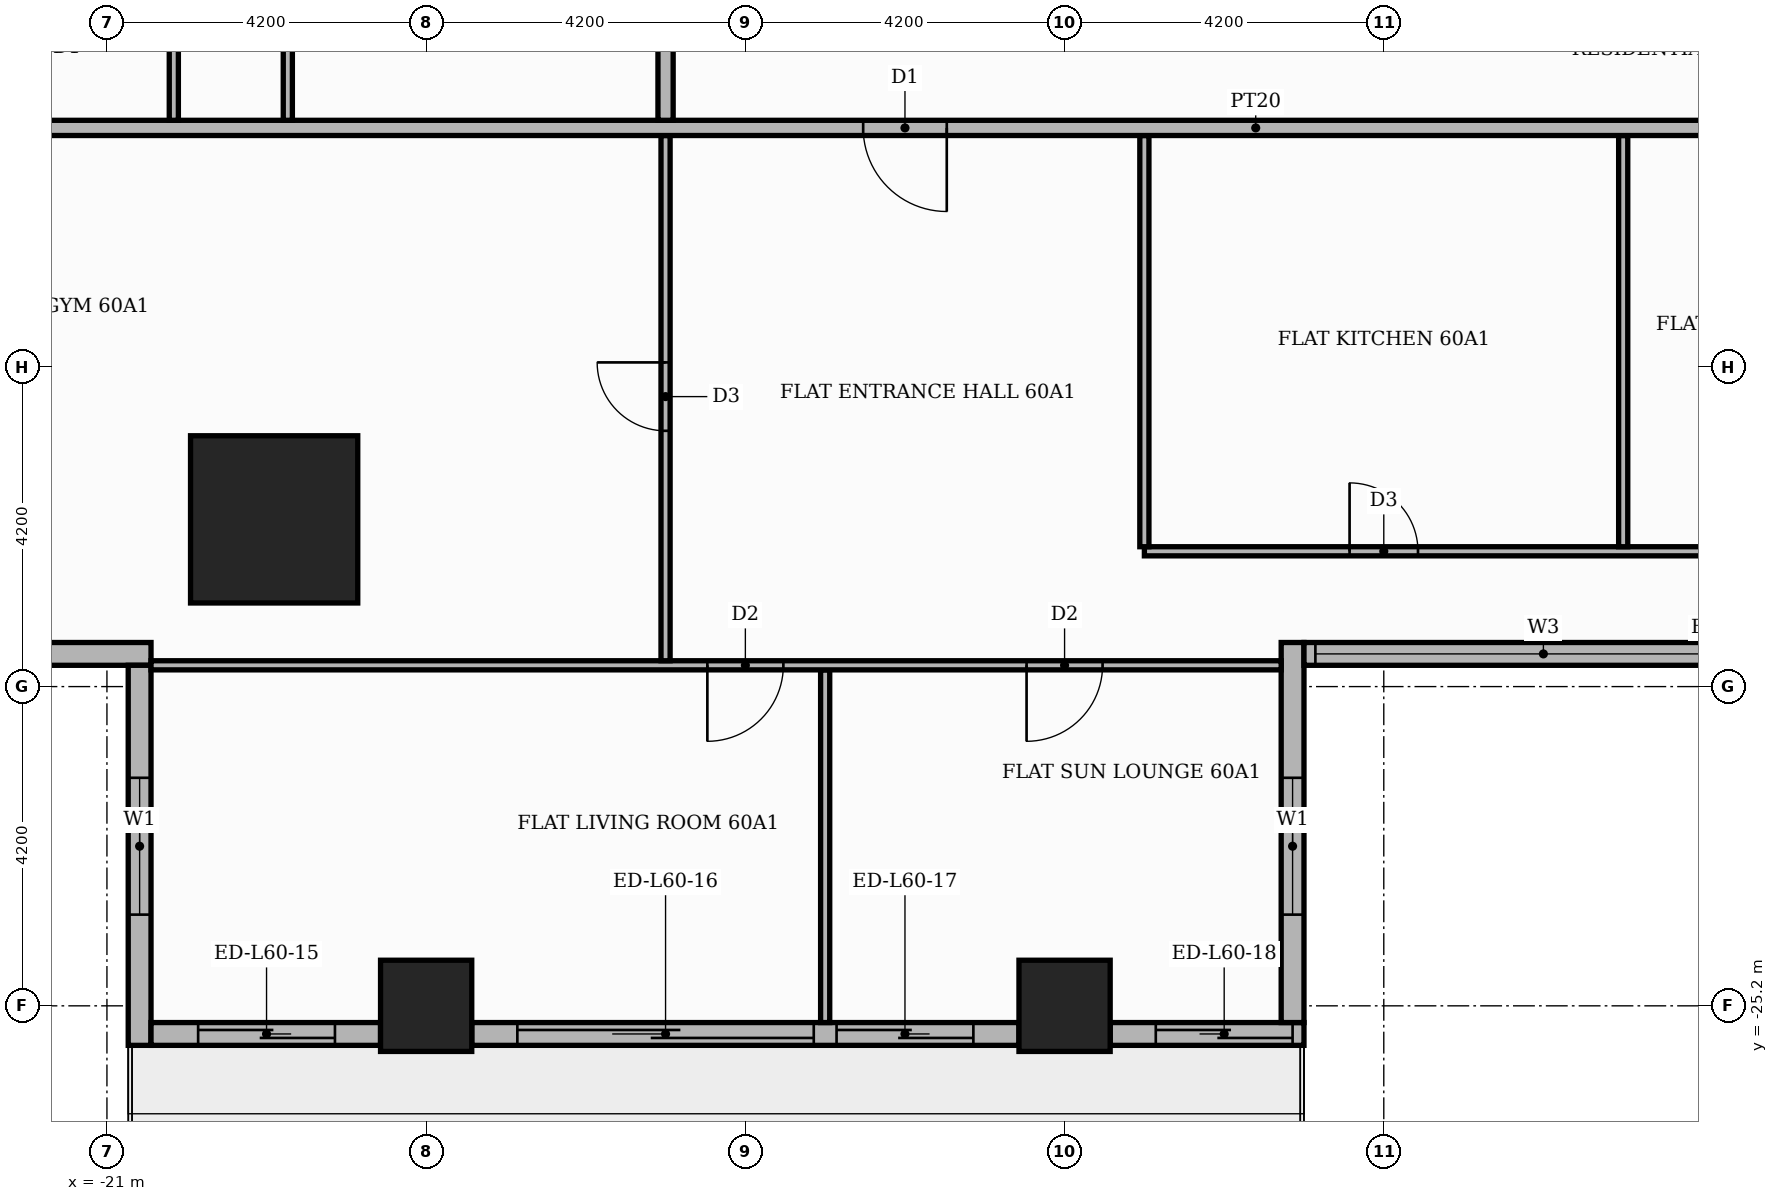
"""IFC4 building model, lengths in metres.
Left out: names, types, materials, properties, quantities, classifications, styles, units other than length and angle.
Written with IfcOpenShell. Run it as: python <this file> out.ifc"""

import sys

from ifc_helpers import new_model, si_unit, direction, frame, frame_2d, origin, origin_2d, place, context, subcontext, project, spatial, rectangle, extrude, element, fill, save


model = new_model("IFC4")
c1 = context("Model", 3, precision=1e-05, world=origin(), true_north=direction((0.0, 1.0)))
c2 = subcontext(c1, "Body", "Model", "MODEL_VIEW")
j1 = project(units=[si_unit("LENGTHUNIT", "METRE"), si_unit("PLANEANGLEUNIT", "RADIAN")], contexts=[c1])
p1 = place(None, origin())
s1 = spatial("IfcSite", under=j1, at=p1, CompositionType="ELEMENT")
p2 = place(p1, origin())
s2 = spatial("IfcBuilding", under=s1, at=p2, CompositionType="ELEMENT")
p3 = place(p2, frame((0.0, 0.0, 252.3)))
s3 = spatial("IfcBuildingStorey", under=s2, at=p3, CompositionType="ELEMENT", Elevation=252.3)
p4 = place(p3, frame((-18.8, -18.8, 0.0), z_axis=(0.0, 0.0, 1.0), x_axis=(1.0, 0.0, 0.0)))
e1 = element("IfcColumn", 1, at=p4, inside=s3, PredefinedType="COLUMN", context=c2, shape_type="SweptSolid", body=[
    extrude(rectangle(XDim=2.2, YDim=2.2, at=origin_2d()), origin(), (0.0, 0.0, 1.0), 3.9),
])
for number, where, z_axis, x_axis in (
    (2, (-8.4, -25.2, 0.0), (0.0, 0.0, 1.0), (1.0, 0.0, 0.0)),
    (3, (-16.8, -25.2, 0.0), (0.0, 0.0, 1.0), (1.0, 0.0, 0.0)),
):
    element("IfcColumn", number, at=place(p3, frame(where, z_axis=z_axis, x_axis=x_axis)), inside=s3, PredefinedType="COLUMN", context=c2, shape_type="SweptSolid", body=[
        extrude(rectangle(XDim=1.2, YDim=1.2, at=origin_2d()), origin(), (0.0, 0.0, 1.0), 3.9),
    ])
p5 = place(p3, frame((-25.42, -20.57, 0.0), z_axis=(0.0, 0.0, 1.0), x_axis=(1.0, 0.0, 0.0)))
e4 = element("IfcWall", 4, at=p5, inside=s3, PredefinedType="STANDARD", context=c2, shape_type="SweptSolid", body=[
    extrude(rectangle(XDim=5.0, YDim=0.3, at=frame_2d((2.5, 0.0))), origin(), (0.0, 0.0, 1.0), 3.48),
])
p6 = place(p5, frame((1.42, 0.0, 0.9)))
e5 = element("IfcOpeningElement", 5, at=p6, cuts=e4, PredefinedType="OPENING", context=c2, shape_type="SweptSolid", body=[
    extrude(rectangle(XDim=1.8, YDim=2.1, at=frame_2d((0.9, 1.05))), frame((0.0, 0.16, 0.0), z_axis=(0.0, -1.0, 0.0), x_axis=(1.0, 0.0, 0.0)), (0.0, 0.0, 1.0), 0.32),
])
p7 = place(p3, frame((-20.57, -20.72, 0.0), z_axis=(0.0, 0.0, 1.0), x_axis=(0.0, -1.0, 0.0)))
e6 = element("IfcWall", 6, at=p7, inside=s3, PredefinedType="STANDARD", context=c2, shape_type="SweptSolid", body=[
    extrude(rectangle(XDim=5.0, YDim=0.3, at=frame_2d((2.5, 0.0))), origin(), (0.0, 0.0, 1.0), 3.48),
])
p8 = place(p7, frame((1.48, 0.0, 0.9)))
e7 = element("IfcOpeningElement", 7, at=p8, cuts=e6, PredefinedType="OPENING", context=c2, shape_type="SweptSolid", body=[
    extrude(rectangle(XDim=1.8, YDim=2.1, at=frame_2d((0.9, 1.05))), frame((0.0, 0.16, 0.0), z_axis=(0.0, -1.0, 0.0), x_axis=(1.0, 0.0, 0.0)), (0.0, 0.0, 1.0), 0.32),
])
p9 = place(p3, frame((-20.42, -25.57, 0.0), z_axis=(0.0, 0.0, 1.0), x_axis=(1.0, 0.0, 0.0)))
e8 = element("IfcWall", 8, at=p9, inside=s3, PredefinedType="STANDARD", context=c2, shape_type="SweptSolid", body=[
    extrude(rectangle(XDim=3.02, YDim=0.3, at=frame_2d((1.51, 0.0))), origin(), (0.0, 0.0, 1.0), 3.48),
])
p10 = place(p9, frame((0.62, 0.0, 0.0)))
e9 = element("IfcOpeningElement", 9, at=p10, cuts=e8, PredefinedType="OPENING", context=c2, shape_type="SweptSolid", body=[
    extrude(rectangle(XDim=1.8, YDim=2.4, at=frame_2d((0.9, 1.2))), frame((0.0, 0.16, 0.0), z_axis=(0.0, -1.0, 0.0), x_axis=(1.0, 0.0, 0.0)), (0.0, 0.0, 1.0), 0.32),
])
p11 = place(p3, frame((-16.2, -25.57, 0.0), z_axis=(0.0, 0.0, 1.0), x_axis=(1.0, 0.0, 0.0)))
e10 = element("IfcWall", 10, at=p11, inside=s3, PredefinedType="STANDARD", context=c2, shape_type="SweptSolid", body=[
    extrude(rectangle(XDim=7.2, YDim=0.3, at=frame_2d((3.6, 0.0))), origin(), (0.0, 0.0, 1.0), 3.48),
])
p12 = place(p11, frame((0.6, 0.0, 0.0)))
e11 = element("IfcOpeningElement", 11, at=p12, cuts=e10, PredefinedType="OPENING", context=c2, shape_type="SweptSolid", body=[
    extrude(rectangle(XDim=3.9, YDim=2.4, at=frame_2d((1.95, 1.2))), frame((0.0, 0.16, 0.0), z_axis=(0.0, -1.0, 0.0), x_axis=(1.0, 0.0, 0.0)), (0.0, 0.0, 1.0), 0.32),
])
p13 = place(p11, frame((4.8, 0.0, 0.0)))
e12 = element("IfcOpeningElement", 12, at=p13, cuts=e10, PredefinedType="OPENING", context=c2, shape_type="SweptSolid", body=[
    extrude(rectangle(XDim=1.8, YDim=2.4, at=frame_2d((0.9, 1.2))), frame((0.0, 0.16, 0.0), z_axis=(0.0, -1.0, 0.0), x_axis=(1.0, 0.0, 0.0)), (0.0, 0.0, 1.0), 0.32),
])
p14 = place(p3, frame((-7.8, -25.57, 0.0), z_axis=(0.0, 0.0, 1.0), x_axis=(1.0, 0.0, 0.0)))
e13 = element("IfcWall", 13, at=p14, inside=s3, PredefinedType="STANDARD", context=c2, shape_type="SweptSolid", body=[
    extrude(rectangle(XDim=2.55, YDim=0.3, at=frame_2d((1.275, 0.0))), origin(), (0.0, 0.0, 1.0), 3.48),
])
p15 = place(p14, frame((0.6, 0.0, 0.0)))
e14 = element("IfcOpeningElement", 14, at=p15, cuts=e13, PredefinedType="OPENING", context=c2, shape_type="SweptSolid", body=[
    extrude(rectangle(XDim=1.8, YDim=2.4, at=frame_2d((0.9, 1.2))), frame((0.0, 0.16, 0.0), z_axis=(0.0, -1.0, 0.0), x_axis=(1.0, 0.0, 0.0)), (0.0, 0.0, 1.0), 0.32),
])
p16 = place(p3, frame((-5.4, -25.42, 0.0), z_axis=(0.0, 0.0, 1.0), x_axis=(0.0, 1.0, 0.0)))
e15 = element("IfcWall", 15, at=p16, inside=s3, PredefinedType="STANDARD", context=c2, shape_type="SweptSolid", body=[
    extrude(rectangle(XDim=5.0, YDim=0.3, at=frame_2d((2.5, 0.0))), origin(), (0.0, 0.0, 1.0), 3.48),
])
p17 = place(p16, frame((1.42, 0.0, 0.9)))
e16 = element("IfcOpeningElement", 16, at=p17, cuts=e15, PredefinedType="OPENING", context=c2, shape_type="SweptSolid", body=[
    extrude(rectangle(XDim=1.8, YDim=2.1, at=frame_2d((0.9, 1.05))), frame((0.0, 0.16, 0.0), z_axis=(0.0, -1.0, 0.0), x_axis=(1.0, 0.0, 0.0)), (0.0, 0.0, 1.0), 0.32),
])
p18 = place(p3, frame((-5.25, -20.57, 0.0), z_axis=(0.0, 0.0, 1.0), x_axis=(1.0, 0.0, 0.0)))
e17 = element("IfcWall", 17, at=p18, inside=s3, PredefinedType="STANDARD", context=c2, shape_type="SweptSolid", body=[
    extrude(rectangle(XDim=10.8, YDim=0.3, at=frame_2d((5.4, 0.0))), origin(), (0.0, 0.0, 1.0), 3.48),
])
p19 = place(p18, frame((0.15, 0.0, 0.9)))
e18 = element("IfcOpeningElement", 18, at=p19, cuts=e17, PredefinedType="OPENING", context=c2, shape_type="SweptSolid", body=[
    extrude(rectangle(XDim=6.0, YDim=2.1, at=frame_2d((3.0, 1.05))), frame((0.0, 0.16, 0.0), z_axis=(0.0, -1.0, 0.0), x_axis=(1.0, 0.0, 0.0)), (0.0, 0.0, 1.0), 0.32),
])
p20 = place(p18, frame((6.45, 0.0, 0.9)))
e19 = element("IfcOpeningElement", 19, at=p20, cuts=e17, PredefinedType="OPENING", context=c2, shape_type="SweptSolid", body=[
    extrude(rectangle(XDim=3.9, YDim=2.1, at=frame_2d((1.95, 1.05))), frame((0.0, 0.16, 0.0), z_axis=(0.0, -1.0, 0.0), x_axis=(1.0, 0.0, 0.0)), (0.0, 0.0, 1.0), 0.32),
])
p21 = place(p3, frame((-11.55, -25.42, 0.0), z_axis=(0.0, 0.0, 1.0), x_axis=(0.0, 1.0, 0.0)))
e20 = element("IfcWall", 20, at=p21, inside=s3, PredefinedType="PARTITIONING", context=c2, shape_type="SweptSolid", body=[
    extrude(rectangle(XDim=4.64, YDim=0.12, at=frame_2d((2.32, 0.0))), origin(), (0.0, 0.0, 1.0), 3.48),
])
p22 = place(p3, frame((-20.42, -20.72, 0.0), z_axis=(0.0, 0.0, 1.0), x_axis=(1.0, 0.0, 0.0)))
e21 = element("IfcWall", 21, at=p22, inside=s3, PredefinedType="PARTITIONING", context=c2, shape_type="SweptSolid", body=[
    extrude(rectangle(XDim=14.87, YDim=0.12, at=frame_2d((7.435, 0.0))), origin(), (0.0, 0.0, 1.0), 3.48),
])
p23 = place(p22, frame((7.32, 0.0, 0.0)))
e22 = element("IfcOpeningElement", 22, at=p23, cuts=e21, PredefinedType="OPENING", context=c2, shape_type="SweptSolid", body=[
    extrude(rectangle(XDim=1.0, YDim=2.1, at=frame_2d((0.5, 1.05))), frame((0.0, 0.07, 0.0), z_axis=(0.0, -1.0, 0.0), x_axis=(1.0, 0.0, 0.0)), (0.0, 0.0, 1.0), 0.14),
])
p24 = place(p22, frame((11.52, 0.0, 0.0)))
e23 = element("IfcOpeningElement", 23, at=p24, cuts=e21, PredefinedType="OPENING", context=c2, shape_type="SweptSolid", body=[
    extrude(rectangle(XDim=1.0, YDim=2.1, at=frame_2d((0.5, 1.05))), frame((0.0, 0.07, 0.0), z_axis=(0.0, -1.0, 0.0), x_axis=(1.0, 0.0, 0.0)), (0.0, 0.0, 1.0), 0.14),
])
p25 = place(p3, frame((-13.65, -20.66, 0.0), z_axis=(0.0, 0.0, 1.0), x_axis=(0.0, 1.0, 0.0)))
e24 = element("IfcWall", 24, at=p25, inside=s3, PredefinedType="PARTITIONING", context=c2, shape_type="SweptSolid", body=[
    extrude(rectangle(XDim=6.91, YDim=0.12, at=frame_2d((3.455, 0.0))), origin(), (0.0, 0.0, 1.0), 3.48),
])
p26 = place(p25, frame((3.025, 0.0, 0.0)))
e25 = element("IfcOpeningElement", 25, at=p26, cuts=e24, PredefinedType="OPENING", context=c2, shape_type="SweptSolid", body=[
    extrude(rectangle(XDim=0.9, YDim=2.1, at=frame_2d((0.45, 1.05))), frame((0.0, 0.07, 0.0), z_axis=(0.0, -1.0, 0.0), x_axis=(1.0, 0.0, 0.0)), (0.0, 0.0, 1.0), 0.14),
])
p27 = place(p3, frame((-7.35, -19.22, 0.0), z_axis=(0.0, 0.0, 1.0), x_axis=(1.0, 0.0, 0.0)))
e26 = element("IfcWall", 26, at=p27, inside=s3, PredefinedType="PARTITIONING", context=c2, shape_type="SweptSolid", body=[
    extrude(rectangle(XDim=20.9, YDim=0.12, at=frame_2d((10.45, 0.0))), origin(), (0.0, 0.0, 1.0), 3.48),
])
p28 = place(p27, frame((2.7, 0.0, 0.0)))
e27 = element("IfcOpeningElement", 27, at=p28, cuts=e26, PredefinedType="OPENING", context=c2, shape_type="SweptSolid", body=[
    extrude(rectangle(XDim=0.9, YDim=2.1, at=frame_2d((0.45, 1.05))), frame((0.0, 0.07, 0.0), z_axis=(0.0, -1.0, 0.0), x_axis=(1.0, 0.0, 0.0)), (0.0, 0.0, 1.0), 0.14),
])
p29 = place(p27, frame((7.95, 0.0, 0.0)))
e28 = element("IfcOpeningElement", 28, at=p29, cuts=e26, PredefinedType="OPENING", context=c2, shape_type="SweptSolid", body=[
    extrude(rectangle(XDim=0.9, YDim=2.1, at=frame_2d((0.45, 1.05))), frame((0.0, 0.07, 0.0), z_axis=(0.0, -1.0, 0.0), x_axis=(1.0, 0.0, 0.0)), (0.0, 0.0, 1.0), 0.14),
])
p30 = place(p27, frame((13.05, 0.0, 0.0)))
e29 = element("IfcOpeningElement", 29, at=p30, cuts=e26, PredefinedType="OPENING", context=c2, shape_type="SweptSolid", body=[
    extrude(rectangle(XDim=0.9, YDim=2.1, at=frame_2d((0.45, 1.05))), frame((0.0, 0.07, 0.0), z_axis=(0.0, -1.0, 0.0), x_axis=(1.0, 0.0, 0.0)), (0.0, 0.0, 1.0), 0.14),
])
p31 = place(p27, frame((17.25, 0.0, 0.0)))
e30 = element("IfcOpeningElement", 30, at=p31, cuts=e26, PredefinedType="OPENING", context=c2, shape_type="SweptSolid", body=[
    extrude(rectangle(XDim=0.9, YDim=2.1, at=frame_2d((0.45, 1.05))), frame((0.0, 0.07, 0.0), z_axis=(0.0, -1.0, 0.0), x_axis=(1.0, 0.0, 0.0)), (0.0, 0.0, 1.0), 0.14),
])
p32 = place(p27, frame((19.5, 0.0, 0.0)))
e31 = element("IfcOpeningElement", 31, at=p32, cuts=e26, PredefinedType="OPENING", context=c2, shape_type="SweptSolid", body=[
    extrude(rectangle(XDim=0.9, YDim=2.1, at=frame_2d((0.45, 1.05))), frame((0.0, 0.07, 0.0), z_axis=(0.0, -1.0, 0.0), x_axis=(1.0, 0.0, 0.0)), (0.0, 0.0, 1.0), 0.14),
])
for number, where, z_axis, x_axis in (
    (32, (-7.35, -19.16, 0.0), (0.0, 0.0, 1.0), (0.0, 1.0, 0.0)),
    (33, (-1.05, -19.16, 0.0), (0.0, 0.0, 1.0), (0.0, 1.0, 0.0)),
):
    element("IfcWall", number, at=place(p3, frame(where, z_axis=z_axis, x_axis=x_axis)), inside=s3, PredefinedType="PARTITIONING", context=c2, shape_type="SweptSolid", body=[
        extrude(rectangle(XDim=5.41, YDim=0.12, at=frame_2d((2.705, 0.0))), origin(), (0.0, 0.0, 1.0), 3.48),
    ])
p33 = place(p3, frame((-25.42, -13.65, 0.0), z_axis=(0.0, 0.0, 1.0), x_axis=(1.0, 0.0, 0.0)))
e34 = element("IfcWall", 34, at=p33, inside=s3, PredefinedType="PARTITIONING", context=c2, shape_type="SweptSolid", body=[
    extrude(rectangle(XDim=39.07, YDim=0.2, at=frame_2d((19.535, 0.0))), origin(), (0.0, 0.0, 1.0), 3.48),
])
p34 = place(p33, frame((14.37, 0.0, 0.0)))
e35 = element("IfcOpeningElement", 35, at=p34, cuts=e34, PredefinedType="OPENING", context=c2, shape_type="SweptSolid", body=[
    extrude(rectangle(XDim=1.1, YDim=2.4, at=frame_2d((0.55, 1.2))), frame((0.0, 0.11, 0.0), z_axis=(0.0, -1.0, 0.0), x_axis=(1.0, 0.0, 0.0)), (0.0, 0.0, 1.0), 0.22),
])
p35 = place(p3, frame((-20.12, -13.55, 0.0), z_axis=(0.0, 0.0, 1.0), x_axis=(0.0, 1.0, 0.0)))
e36 = element("IfcWall", 36, at=p35, inside=s3, PredefinedType="PARTITIONING", context=c2, shape_type="SweptSolid", body=[
    extrude(rectangle(XDim=1.94, YDim=0.12, at=frame_2d((0.97, 0.0))), origin(), (0.0, 0.0, 1.0), 3.48),
])
p36 = place(p3, frame((-18.62, -13.55, 0.0), z_axis=(0.0, 0.0, 1.0), x_axis=(0.0, 1.0, 0.0)))
e37 = element("IfcWall", 37, at=p36, inside=s3, PredefinedType="PARTITIONING", context=c2, shape_type="SweptSolid", body=[
    extrude(rectangle(XDim=4.04, YDim=0.12, at=frame_2d((2.02, 0.0))), origin(), (0.0, 0.0, 1.0), 3.48),
])
p37 = place(p36, frame((1.55, 0.0, 0.0)))
e38 = element("IfcOpeningElement", 38, at=p37, cuts=e37, PredefinedType="OPENING", context=c2, shape_type="SweptSolid", body=[
    extrude(rectangle(XDim=0.9, YDim=2.1, at=frame_2d((0.45, 1.05))), frame((0.0, 0.07, 0.0), z_axis=(0.0, -1.0, 0.0), x_axis=(1.0, 0.0, 0.0)), (0.0, 0.0, 1.0), 0.14),
])
p38 = place(p3, frame((-13.65, -13.55, 0.0), z_axis=(0.0, 0.0, 1.0), x_axis=(0.0, 1.0, 0.0)))
e39 = element("IfcWall", 39, at=p38, inside=s3, PredefinedType="PARTITIONING", context=c2, shape_type="SweptSolid", body=[
    extrude(rectangle(XDim=2.45, YDim=0.2, at=frame_2d((1.225, 0.0))), origin(), (0.0, 0.0, 1.0), 3.48),
])
p39 = place(p8, origin())
e40 = element("IfcWindow", 40, at=p39, inside=s3, PartitioningType="SINGLE_PANEL", PredefinedType="WINDOW", context=c2, shape_type="SweptSolid", body=[
    extrude(rectangle(XDim=1.8, YDim=2.1, at=frame_2d((0.9, 1.05))), frame((0.0, 0.03, 0.0), z_axis=(0.0, -1.0, 0.0), x_axis=(1.0, 0.0, 0.0)), (0.0, 0.0, 1.0), 0.06),
])
fill(e7, e40)
p40 = place(p10, origin())
e41 = element("IfcDoor", 41, at=p40, inside=s3, OperationType="SLIDING_TO_RIGHT", PredefinedType="DOOR", context=c2, shape_type="SweptSolid", body=[
    extrude(rectangle(XDim=1.8, YDim=2.4, at=frame_2d((0.9, 1.2))), frame((0.0, 0.025, 0.0), z_axis=(0.0, -1.0, 0.0), x_axis=(1.0, 0.0, 0.0)), (0.0, 0.0, 1.0), 0.05),
])
fill(e9, e41)
p41 = place(p12, origin())
e42 = element("IfcDoor", 42, at=p41, inside=s3, OperationType="SLIDING_TO_LEFT", PredefinedType="DOOR", context=c2, shape_type="SweptSolid", body=[
    extrude(rectangle(XDim=3.9, YDim=2.4, at=frame_2d((1.95, 1.2))), frame((0.0, 0.025, 0.0), z_axis=(0.0, -1.0, 0.0), x_axis=(1.0, 0.0, 0.0)), (0.0, 0.0, 1.0), 0.05),
])
fill(e11, e42)
p42 = place(p13, origin())
e43 = element("IfcDoor", 43, at=p42, inside=s3, OperationType="SLIDING_TO_RIGHT", PredefinedType="DOOR", context=c2, shape_type="SweptSolid", body=[
    extrude(rectangle(XDim=1.8, YDim=2.4, at=frame_2d((0.9, 1.2))), frame((0.0, 0.025, 0.0), z_axis=(0.0, -1.0, 0.0), x_axis=(1.0, 0.0, 0.0)), (0.0, 0.0, 1.0), 0.05),
])
fill(e12, e43)
p43 = place(p15, origin())
e44 = element("IfcDoor", 44, at=p43, inside=s3, OperationType="SLIDING_TO_LEFT", PredefinedType="DOOR", context=c2, shape_type="SweptSolid", body=[
    extrude(rectangle(XDim=1.8, YDim=2.4, at=frame_2d((0.9, 1.2))), frame((0.0, 0.025, 0.0), z_axis=(0.0, -1.0, 0.0), x_axis=(1.0, 0.0, 0.0)), (0.0, 0.0, 1.0), 0.05),
])
fill(e14, e44)
p44 = place(p17, origin())
e45 = element("IfcWindow", 45, at=p44, inside=s3, PartitioningType="SINGLE_PANEL", PredefinedType="WINDOW", context=c2, shape_type="SweptSolid", body=[
    extrude(rectangle(XDim=1.8, YDim=2.1, at=frame_2d((0.9, 1.05))), frame((0.0, 0.03, 0.0), z_axis=(0.0, -1.0, 0.0), x_axis=(1.0, 0.0, 0.0)), (0.0, 0.0, 1.0), 0.06),
])
fill(e16, e45)
p45 = place(p19, origin())
e46 = element("IfcWindow", 46, at=p45, inside=s3, PartitioningType="SINGLE_PANEL", PredefinedType="WINDOW", context=c2, shape_type="SweptSolid", body=[
    extrude(rectangle(XDim=6.0, YDim=2.1, at=frame_2d((3.0, 1.05))), frame((0.0, 0.03, 0.0), z_axis=(0.0, -1.0, 0.0), x_axis=(1.0, 0.0, 0.0)), (0.0, 0.0, 1.0), 0.06),
])
fill(e18, e46)
p46 = place(p34, frame((1.1, 0.0, 0.0), z_axis=(0.0, 0.0, 1.0), x_axis=(-1.0, 0.0, 0.0)))
e47 = element("IfcDoor", 47, at=p46, inside=s3, OperationType="SINGLE_SWING_RIGHT", PredefinedType="DOOR", context=c2, shape_type="SweptSolid", body=[
    extrude(rectangle(XDim=1.1, YDim=2.4, at=frame_2d((0.55, 1.2))), frame((0.0, 0.025, 0.0), z_axis=(0.0, -1.0, 0.0), x_axis=(1.0, 0.0, 0.0)), (0.0, 0.0, 1.0), 0.05),
])
fill(e35, e47)
p47 = place(p26, origin())
e48 = element("IfcDoor", 48, at=p47, inside=s3, OperationType="SINGLE_SWING_RIGHT", PredefinedType="DOOR", context=c2, shape_type="SweptSolid", body=[
    extrude(rectangle(XDim=0.9, YDim=2.1, at=frame_2d((0.45, 1.05))), frame((0.0, 0.025, 0.0), z_axis=(0.0, -1.0, 0.0), x_axis=(1.0, 0.0, 0.0)), (0.0, 0.0, 1.0), 0.05),
])
fill(e25, e48)
p48 = place(p28, origin())
e49 = element("IfcDoor", 49, at=p48, inside=s3, OperationType="SINGLE_SWING_LEFT", PredefinedType="DOOR", context=c2, shape_type="SweptSolid", body=[
    extrude(rectangle(XDim=0.9, YDim=2.1, at=frame_2d((0.45, 1.05))), frame((0.0, 0.025, 0.0), z_axis=(0.0, -1.0, 0.0), x_axis=(1.0, 0.0, 0.0)), (0.0, 0.0, 1.0), 0.05),
])
fill(e27, e49)
p49 = place(p23, frame((1.0, 0.0, 0.0), z_axis=(0.0, 0.0, 1.0), x_axis=(-1.0, 0.0, 0.0)))
e50 = element("IfcDoor", 50, at=p49, inside=s3, OperationType="SINGLE_SWING_LEFT", PredefinedType="DOOR", context=c2, shape_type="SweptSolid", body=[
    extrude(rectangle(XDim=1.0, YDim=2.1, at=frame_2d((0.5, 1.05))), frame((0.0, 0.025, 0.0), z_axis=(0.0, -1.0, 0.0), x_axis=(1.0, 0.0, 0.0)), (0.0, 0.0, 1.0), 0.05),
])
fill(e22, e50)
p50 = place(p24, frame((1.0, 0.0, 0.0), z_axis=(0.0, 0.0, 1.0), x_axis=(-1.0, 0.0, 0.0)))
e51 = element("IfcDoor", 51, at=p50, inside=s3, OperationType="SINGLE_SWING_LEFT", PredefinedType="DOOR", context=c2, shape_type="SweptSolid", body=[
    extrude(rectangle(XDim=1.0, YDim=2.1, at=frame_2d((0.5, 1.05))), frame((0.0, 0.025, 0.0), z_axis=(0.0, -1.0, 0.0), x_axis=(1.0, 0.0, 0.0)), (0.0, 0.0, 1.0), 0.05),
])
fill(e23, e51)
save(model, sys.argv[1])
